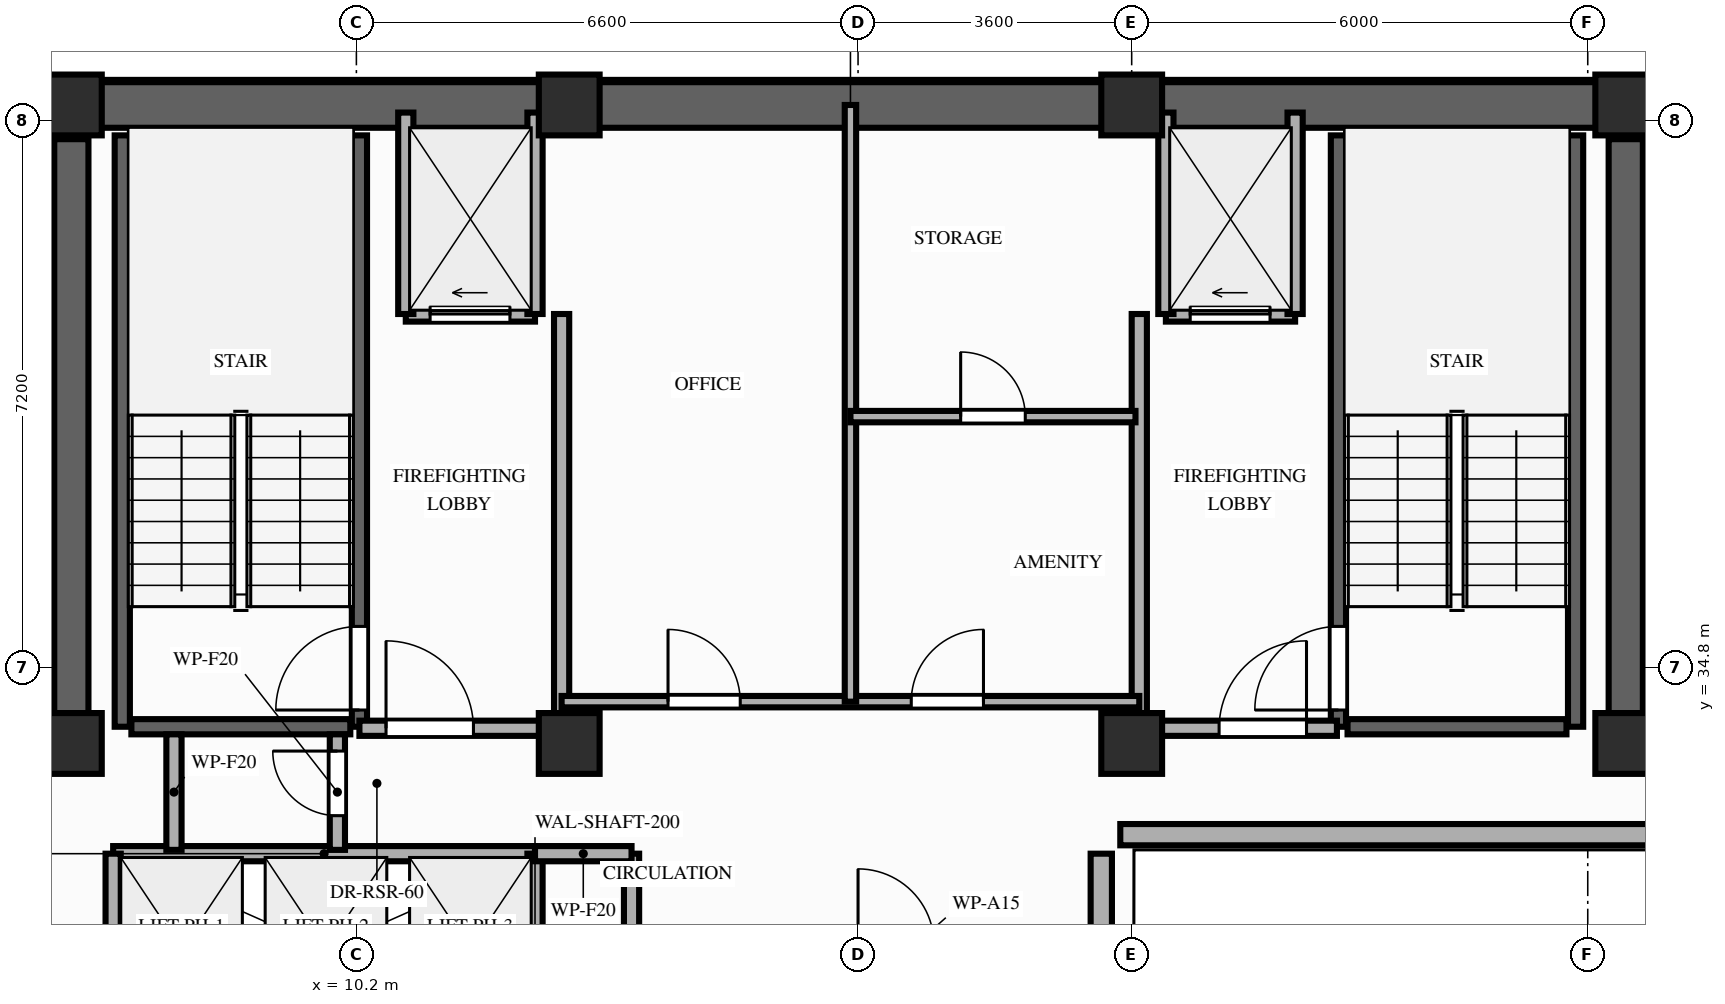
"""IFC4 building model, lengths in metres.
Left out: names, types, materials, properties, quantities, classifications, styles, units other than length and angle.
Written with IfcOpenShell. Run it as: python <this file> out.ifc"""

import sys

from ifc_helpers import new_model, si_unit, direction, frame, frame_2d, origin, origin_2d, place, context, subcontext, project, spatial, rectangle, extrude, element, fill, save


model = new_model("IFC4")
c1 = context("Model", 3, precision=1e-05, world=origin(), true_north=direction((0.0, 1.0)))
c2 = subcontext(c1, "Body", "Model", "MODEL_VIEW")
j1 = project(units=[si_unit("LENGTHUNIT", "METRE"), si_unit("PLANEANGLEUNIT", "RADIAN")], contexts=[c1])
p1 = place(None, origin())
s1 = spatial("IfcSite", under=j1, at=p1, CompositionType="ELEMENT")
p2 = place(p1, origin())
s2 = spatial("IfcBuilding", under=s1, at=p2, CompositionType="ELEMENT")
p3 = place(p2, frame((0.0, 0.0, 208.0)))
s3 = spatial("IfcBuildingStorey", under=s2, at=p3, CompositionType="ELEMENT", Elevation=208.0)
for number, where, z_axis, x_axis in (
    (1, (6.45, 33.8, 0.0), (0.0, 0.0, 1.0), (1.0, 0.0, 0.0)),
    (2, (13.0, 33.8, 0.0), (0.0, 0.0, 1.0), (1.0, 0.0, 0.0)),
    (3, (20.4, 33.8, 0.0), (0.0, 0.0, 1.0), (1.0, 0.0, 0.0)),
    (4, (26.9, 33.8, 0.0), (0.0, 0.0, 1.0), (1.0, 0.0, 0.0)),
    (5, (6.45, 42.2, 0.0), (0.0, 0.0, 1.0), (1.0, 0.0, 0.0)),
    (6, (13.0, 42.2, 0.0), (0.0, 0.0, 1.0), (1.0, 0.0, 0.0)),
    (7, (20.4, 42.2, 0.0), (0.0, 0.0, 1.0), (1.0, 0.0, 0.0)),
    (8, (26.9, 42.2, 0.0), (0.0, 0.0, 1.0), (1.0, 0.0, 0.0)),
):
    element("IfcColumn", number, at=place(p3, frame(where, z_axis=z_axis, x_axis=x_axis)), inside=s3, PredefinedType="COLUMN", context=c2, shape_type="SweptSolid", body=[
        extrude(rectangle(XDim=0.8, YDim=0.8, at=origin_2d()), origin(), (0.0, 0.0, 1.0), 3.2),
    ])
p4 = place(p3, frame((20.0, 8.8, 0.0), z_axis=(0.0, 0.0, 1.0), x_axis=(0.0, 1.0, 0.0)))
e9 = element("IfcWall", 9, at=p4, inside=s3, PredefinedType="STANDARD", context=c2, shape_type="SweptSolid", body=[
    extrude(rectangle(XDim=23.55, YDim=0.28, at=frame_2d((11.775, 0.0))), origin(), (0.0, 0.0, 1.0), 2.51),
])
p5 = place(p4, frame((5.12, 0.0, 0.85)))
e10 = element("IfcOpeningElement", 10, at=p5, cuts=e9, PredefinedType="OPENING", context=c2, shape_type="SweptSolid", body=[
    extrude(rectangle(XDim=2.1, YDim=1.41, at=frame_2d((1.05, 0.705))), frame((0.0, 0.15, 0.0), z_axis=(0.0, -1.0, 0.0), x_axis=(1.0, 0.0, 0.0)), (0.0, 0.0, 1.0), 0.3),
])
p6 = place(p3, frame((20.25, 32.6, 0.0), z_axis=(0.0, 0.0, 1.0), x_axis=(1.0, 0.0, 0.0)))
e11 = element("IfcWall", 11, at=p6, inside=s3, PredefinedType="STANDARD", context=c2, shape_type="SweptSolid", body=[
    extrude(rectangle(XDim=7.35, YDim=0.28, at=frame_2d((3.675, 0.0))), origin(), (0.0, 0.0, 1.0), 2.51),
])
p7 = place(p3, frame((6.45, 42.2, 0.0), z_axis=(0.0, 0.0, 1.0), x_axis=(1.0, 0.0, 0.0)))
e12 = element("IfcWall", 12, at=p7, inside=s3, PredefinedType="SHEAR", context=c2, shape_type="SweptSolid", body=[
    extrude(rectangle(XDim=20.45, YDim=0.6, at=frame_2d((10.225, 0.0))), origin(), (0.0, 0.0, 1.0), 3.02),
])
for number, where, z_axis, x_axis in (
    (13, (6.45, 33.8, 0.0), (0.0, 0.0, 1.0), (0.0, 1.0, 0.0)),
    (14, (26.9, 33.8, 0.0), (0.0, 0.0, 1.0), (0.0, 1.0, 0.0)),
):
    element("IfcWall", number, at=place(p3, frame(where, z_axis=z_axis, x_axis=x_axis)), inside=s3, PredefinedType="SHEAR", context=c2, shape_type="SweptSolid", body=[
        extrude(rectangle(XDim=7.95, YDim=0.45, at=frame_2d((3.975, 0.0))), origin(), (0.0, 0.0, 1.0), 3.02),
    ])
p8 = place(p3, frame((7.12, 34.02, 0.0), z_axis=(0.0, 0.0, 1.0), x_axis=(0.0, 1.0, 0.0)))
e15 = element("IfcWall", 15, at=p8, inside=s3, PredefinedType="SHEAR", context=c2, shape_type="SweptSolid", body=[
    extrude(rectangle(XDim=7.78, YDim=0.2, at=frame_2d((3.89, 0.0))), origin(), (0.0, 0.0, 1.0), 3.02),
])
p9 = place(p3, frame((10.24, 34.02, 0.0), z_axis=(0.0, 0.0, 1.0), x_axis=(0.0, 1.0, 0.0)))
e16 = element("IfcWall", 16, at=p9, inside=s3, PredefinedType="SHEAR", context=c2, shape_type="SweptSolid", body=[
    extrude(rectangle(XDim=7.78, YDim=0.2, at=frame_2d((3.89, 0.0))), origin(), (0.0, 0.0, 1.0), 3.02),
])
p10 = place(p9, frame((0.22, 0.0, 0.0)))
e17 = element("IfcOpeningElement", 17, at=p10, cuts=e16, PredefinedType="OPENING", context=c2, shape_type="SweptSolid", body=[
    extrude(rectangle(XDim=1.1, YDim=2.15, at=frame_2d((0.55, 1.075))), frame((0.0, 0.11, 0.0), z_axis=(0.0, -1.0, 0.0), x_axis=(1.0, 0.0, 0.0)), (0.0, 0.0, 1.0), 0.22),
])
p11 = place(p3, frame((7.24, 34.02, 0.0), z_axis=(0.0, 0.0, 1.0), x_axis=(1.0, 0.0, 0.0)))
e18 = element("IfcWall", 18, at=p11, inside=s3, PredefinedType="SHEAR", context=c2, shape_type="SweptSolid", body=[
    extrude(rectangle(XDim=2.88, YDim=0.2, at=frame_2d((1.44, 0.0))), origin(), (0.0, 0.0, 1.0), 3.02),
])
p12 = place(p3, frame((23.12, 34.02, 0.0), z_axis=(0.0, 0.0, 1.0), x_axis=(0.0, 1.0, 0.0)))
e19 = element("IfcWall", 19, at=p12, inside=s3, PredefinedType="SHEAR", context=c2, shape_type="SweptSolid", body=[
    extrude(rectangle(XDim=7.78, YDim=0.2, at=frame_2d((3.89, 0.0))), origin(), (0.0, 0.0, 1.0), 3.02),
])
p13 = place(p12, frame((0.22, 0.0, 0.0)))
e20 = element("IfcOpeningElement", 20, at=p13, cuts=e19, PredefinedType="OPENING", context=c2, shape_type="SweptSolid", body=[
    extrude(rectangle(XDim=1.1, YDim=2.15, at=frame_2d((0.55, 1.075))), frame((0.0, 0.11, 0.0), z_axis=(0.0, -1.0, 0.0), x_axis=(1.0, 0.0, 0.0)), (0.0, 0.0, 1.0), 0.22),
])
p14 = place(p3, frame((26.24, 34.02, 0.0), z_axis=(0.0, 0.0, 1.0), x_axis=(0.0, 1.0, 0.0)))
e21 = element("IfcWall", 21, at=p14, inside=s3, PredefinedType="SHEAR", context=c2, shape_type="SweptSolid", body=[
    extrude(rectangle(XDim=7.78, YDim=0.2, at=frame_2d((3.89, 0.0))), origin(), (0.0, 0.0, 1.0), 3.02),
])
p15 = place(p3, frame((23.24, 34.02, 0.0), z_axis=(0.0, 0.0, 1.0), x_axis=(1.0, 0.0, 0.0)))
e22 = element("IfcWall", 22, at=p15, inside=s3, PredefinedType="SHEAR", context=c2, shape_type="SweptSolid", body=[
    extrude(rectangle(XDim=2.88, YDim=0.2, at=frame_2d((1.44, 0.0))), origin(), (0.0, 0.0, 1.0), 3.02),
])
p16 = place(p3, frame((7.0, 32.35, 0.0), z_axis=(0.0, 0.0, 1.0), x_axis=(1.0, 0.0, 0.0)))
e23 = element("IfcWall", 23, at=p16, inside=s3, PredefinedType="MOVABLE", context=c2, shape_type="SweptSolid", body=[
    extrude(rectangle(XDim=5.55, YDim=0.2, at=frame_2d((2.775, 0.0))), origin(), (0.0, 0.0, 1.0), 3.02),
])
for number, where, z_axis, x_axis in (
    (24, (7.0, 29.85, 0.0), (0.0, 0.0, 1.0), (0.0, 1.0, 0.0)),
    (25, (12.55, 29.85, 0.0), (0.0, 0.0, 1.0), (0.0, 1.0, 0.0)),
):
    element("IfcWall", number, at=place(p3, frame(where, z_axis=z_axis, x_axis=x_axis)), inside=s3, PredefinedType="MOVABLE", context=c2, shape_type="SweptSolid", body=[
        extrude(rectangle(XDim=2.5, YDim=0.2, at=frame_2d((1.25, 0.0))), origin(), (0.0, 0.0, 1.0), 3.02),
    ])
p17 = place(p3, frame((10.85, 39.45, 0.0), z_axis=(0.0, 0.0, 1.0), x_axis=(1.0, 0.0, 0.0)))
e26 = element("IfcWall", 26, at=p17, inside=s3, PredefinedType="MOVABLE", context=c2, shape_type="SweptSolid", body=[
    extrude(rectangle(XDim=1.7, YDim=0.2, at=frame_2d((0.85, 0.0))), origin(), (0.0, 0.0, 1.0), 3.02),
])
p18 = place(p17, frame((0.32, 0.0, 0.0)))
e27 = element("IfcOpeningElement", 27, at=p18, cuts=e26, PredefinedType="OPENING", context=c2, shape_type="SweptSolid", body=[
    extrude(rectangle(XDim=1.05, YDim=2.15, at=frame_2d((0.525, 1.075))), frame((0.0, 0.11, 0.0), z_axis=(0.0, -1.0, 0.0), x_axis=(1.0, 0.0, 0.0)), (0.0, 0.0, 1.0), 0.22),
])
p19 = place(p3, frame((20.85, 39.45, 0.0), z_axis=(0.0, 0.0, 1.0), x_axis=(1.0, 0.0, 0.0)))
e28 = element("IfcWall", 28, at=p19, inside=s3, PredefinedType="MOVABLE", context=c2, shape_type="SweptSolid", body=[
    extrude(rectangle(XDim=1.7, YDim=0.2, at=frame_2d((0.85, 0.0))), origin(), (0.0, 0.0, 1.0), 3.02),
])
p20 = place(p19, frame((0.32, 0.0, 0.0)))
e29 = element("IfcOpeningElement", 29, at=p20, cuts=e28, PredefinedType="OPENING", context=c2, shape_type="SweptSolid", body=[
    extrude(rectangle(XDim=1.05, YDim=2.15, at=frame_2d((0.525, 1.075))), frame((0.0, 0.11, 0.0), z_axis=(0.0, -1.0, 0.0), x_axis=(1.0, 0.0, 0.0)), (0.0, 0.0, 1.0), 0.22),
])
for number, where, z_axis, x_axis in (
    (30, (10.85, 39.45, 0.0), (0.0, 0.0, 1.0), (0.0, 1.0, 0.0)),
    (31, (12.55, 39.45, 0.0), (0.0, 0.0, 1.0), (0.0, 1.0, 0.0)),
):
    element("IfcWall", number, at=place(p3, frame(where, z_axis=z_axis, x_axis=x_axis)), inside=s3, PredefinedType="MOVABLE", context=c2, shape_type="SweptSolid", body=[
        extrude(rectangle(XDim=2.65, YDim=0.2, at=frame_2d((1.325, 0.0))), origin(), (0.0, 0.0, 1.0), 2.51),
    ])
p21 = place(p3, frame((12.9, 34.0, 0.0), z_axis=(0.0, 0.0, 1.0), x_axis=(0.0, 1.0, 0.0)))
e32 = element("IfcWall", 32, at=p21, inside=s3, PredefinedType="PARTITIONING", context=c2, shape_type="SweptSolid", body=[
    extrude(rectangle(XDim=5.45, YDim=0.2, at=frame_2d((2.725, 0.0))), origin(), (0.0, 0.0, 1.0), 2.51),
])
p22 = place(p3, frame((10.24, 34.0, 0.0), z_axis=(0.0, 0.0, 1.0), x_axis=(1.0, 0.0, 0.0)))
e33 = element("IfcWall", 33, at=p22, inside=s3, PredefinedType="PARTITIONING", context=c2, shape_type="SweptSolid", body=[
    extrude(rectangle(XDim=2.66, YDim=0.2, at=frame_2d((1.33, 0.0))), origin(), (0.0, 0.0, 1.0), 2.51),
])
p23 = place(p22, frame((0.35, 0.0, 0.0)))
e34 = element("IfcOpeningElement", 34, at=p23, cuts=e33, PredefinedType="OPENING", context=c2, shape_type="SweptSolid", body=[
    extrude(rectangle(XDim=1.15, YDim=2.15, at=frame_2d((0.575, 1.075))), frame((0.0, 0.11, 0.0), z_axis=(0.0, -1.0, 0.0), x_axis=(1.0, 0.0, 0.0)), (0.0, 0.0, 1.0), 0.22),
])
for number, where, z_axis, x_axis in (
    (35, (20.85, 39.45, 0.0), (0.0, 0.0, 1.0), (0.0, 1.0, 0.0)),
    (36, (22.55, 39.45, 0.0), (0.0, 0.0, 1.0), (0.0, 1.0, 0.0)),
):
    element("IfcWall", number, at=place(p3, frame(where, z_axis=z_axis, x_axis=x_axis)), inside=s3, PredefinedType="MOVABLE", context=c2, shape_type="SweptSolid", body=[
        extrude(rectangle(XDim=2.65, YDim=0.2, at=frame_2d((1.325, 0.0))), origin(), (0.0, 0.0, 1.0), 2.51),
    ])
p24 = place(p3, frame((20.5, 34.0, 0.0), z_axis=(0.0, 0.0, 1.0), x_axis=(0.0, 1.0, 0.0)))
e37 = element("IfcWall", 37, at=p24, inside=s3, PredefinedType="PARTITIONING", context=c2, shape_type="SweptSolid", body=[
    extrude(rectangle(XDim=5.45, YDim=0.2, at=frame_2d((2.725, 0.0))), origin(), (0.0, 0.0, 1.0), 2.51),
])
p25 = place(p3, frame((20.5, 34.0, 0.0), z_axis=(0.0, 0.0, 1.0), x_axis=(1.0, 0.0, 0.0)))
e38 = element("IfcWall", 38, at=p25, inside=s3, PredefinedType="PARTITIONING", context=c2, shape_type="SweptSolid", body=[
    extrude(rectangle(XDim=2.6, YDim=0.2, at=frame_2d((1.3, 0.0))), origin(), (0.0, 0.0, 1.0), 2.51),
])
p26 = place(p25, frame((1.05, 0.0, 0.0)))
e39 = element("IfcOpeningElement", 39, at=p26, cuts=e38, PredefinedType="OPENING", context=c2, shape_type="SweptSolid", body=[
    extrude(rectangle(XDim=1.15, YDim=2.15, at=frame_2d((0.575, 1.075))), frame((0.0, 0.11, 0.0), z_axis=(0.0, -1.0, 0.0), x_axis=(1.0, 0.0, 0.0)), (0.0, 0.0, 1.0), 0.22),
])
p27 = place(p3, frame((13.82, 29.85, 0.0), z_axis=(0.0, 0.0, 1.0), x_axis=(0.0, 1.0, 0.0)))
e40 = element("IfcWall", 40, at=p27, inside=s3, PredefinedType="PARTITIONING", context=c2, shape_type="SweptSolid", body=[
    extrude(rectangle(XDim=2.5, YDim=0.2, at=frame_2d((1.25, 0.0))), origin(), (0.0, 0.0, 1.0), 3.02),
])
p28 = place(p3, frame((12.55, 32.35, 0.0), z_axis=(0.0, 0.0, 1.0), x_axis=(1.0, 0.0, 0.0)))
e41 = element("IfcWall", 41, at=p28, inside=s3, PredefinedType="PARTITIONING", context=c2, shape_type="SweptSolid", body=[
    extrude(rectangle(XDim=1.27, YDim=0.2, at=frame_2d((0.635, 0.0))), origin(), (0.0, 0.0, 1.0), 3.02),
])
p29 = place(p3, frame((7.8, 32.4, 0.0), z_axis=(0.0, 0.0, 1.0), x_axis=(0.0, 1.0, 0.0)))
e42 = element("IfcWall", 42, at=p29, inside=s3, PredefinedType="PARTITIONING", context=c2, shape_type="SweptSolid", body=[
    extrude(rectangle(XDim=1.52, YDim=0.2, at=frame_2d((0.76, 0.0))), origin(), (0.0, 0.0, 1.0), 2.51),
])
p30 = place(p3, frame((9.95, 32.4, 0.0), z_axis=(0.0, 0.0, 1.0), x_axis=(0.0, 1.0, 0.0)))
e43 = element("IfcWall", 43, at=p30, inside=s3, PredefinedType="PARTITIONING", context=c2, shape_type="SweptSolid", body=[
    extrude(rectangle(XDim=1.52, YDim=0.2, at=frame_2d((0.76, 0.0))), origin(), (0.0, 0.0, 1.0), 2.51),
])
p31 = place(p30, frame((0.45, 0.0, 0.0)))
e44 = element("IfcOpeningElement", 44, at=p31, cuts=e43, PredefinedType="OPENING", context=c2, shape_type="SweptSolid", body=[
    extrude(rectangle(XDim=0.85, YDim=2.05, at=frame_2d((0.425, 1.025))), frame((0.0, 0.11, 0.0), z_axis=(0.0, -1.0, 0.0), x_axis=(1.0, 0.0, 0.0)), (0.0, 0.0, 1.0), 0.22),
])
p32 = place(p3, frame((12.9, 34.35, 0.0), z_axis=(0.0, 0.0, 1.0), x_axis=(1.0, 0.0, 0.0)))
e45 = element("IfcWall", 45, at=p32, inside=s3, PredefinedType="PARTITIONING", context=c2, shape_type="SweptSolid", body=[
    extrude(rectangle(XDim=7.6, YDim=0.15, at=frame_2d((3.8, 0.0))), origin(), (0.0, 0.0, 1.0), 3.02),
])
p33 = place(p32, frame((1.4, 0.0, 0.0)))
e46 = element("IfcOpeningElement", 46, at=p33, cuts=e45, PredefinedType="OPENING", context=c2, shape_type="SweptSolid", body=[
    extrude(rectangle(XDim=0.95, YDim=2.15, at=frame_2d((0.475, 1.075))), frame((0.0, 0.085, 0.0), z_axis=(0.0, -1.0, 0.0), x_axis=(1.0, 0.0, 0.0)), (0.0, 0.0, 1.0), 0.17),
])
p34 = place(p32, frame((4.6, 0.0, 0.0)))
e47 = element("IfcOpeningElement", 47, at=p34, cuts=e45, PredefinedType="OPENING", context=c2, shape_type="SweptSolid", body=[
    extrude(rectangle(XDim=0.95, YDim=2.15, at=frame_2d((0.475, 1.075))), frame((0.0, 0.085, 0.0), z_axis=(0.0, -1.0, 0.0), x_axis=(1.0, 0.0, 0.0)), (0.0, 0.0, 1.0), 0.17),
])
p35 = place(p3, frame((16.7, 34.35, 0.0), z_axis=(0.0, 0.0, 1.0), x_axis=(0.0, 1.0, 0.0)))
e48 = element("IfcWall", 48, at=p35, inside=s3, PredefinedType="PARTITIONING", context=c2, shape_type="SweptSolid", body=[
    extrude(rectangle(XDim=7.85, YDim=0.15, at=frame_2d((3.925, 0.0))), origin(), (0.0, 0.0, 1.0), 2.51),
])
p36 = place(p3, frame((16.7, 38.1, 0.0), z_axis=(0.0, 0.0, 1.0), x_axis=(1.0, 0.0, 0.0)))
e49 = element("IfcWall", 49, at=p36, inside=s3, PredefinedType="PARTITIONING", context=c2, shape_type="SweptSolid", body=[
    extrude(rectangle(XDim=3.75, YDim=0.15, at=frame_2d((1.875, 0.0))), origin(), (0.0, 0.0, 1.0), 3.02),
])
p37 = place(p36, frame((1.45, 0.0, 0.0)))
e50 = element("IfcOpeningElement", 50, at=p37, cuts=e49, PredefinedType="OPENING", context=c2, shape_type="SweptSolid", body=[
    extrude(rectangle(XDim=0.85, YDim=2.05, at=frame_2d((0.425, 1.025))), frame((0.0, 0.085, 0.0), z_axis=(0.0, -1.0, 0.0), x_axis=(1.0, 0.0, 0.0)), (0.0, 0.0, 1.0), 0.17),
])
p38 = place(p10, origin())
e51 = element("IfcDoor", 51, at=p38, inside=s3, OperationType="SINGLE_SWING_LEFT", PredefinedType="DOOR", context=c2, shape_type="SweptSolid", body=[
    extrude(rectangle(XDim=1.1, YDim=2.15, at=frame_2d((0.55, 1.075))), frame((0.0, 0.025, 0.0), z_axis=(0.0, -1.0, 0.0), x_axis=(1.0, 0.0, 0.0)), (0.0, 0.0, 1.0), 0.05),
])
fill(e17, e51)
p39 = place(p13, origin())
e52 = element("IfcDoor", 52, at=p39, inside=s3, OperationType="SINGLE_SWING_LEFT", PredefinedType="DOOR", context=c2, shape_type="SweptSolid", body=[
    extrude(rectangle(XDim=1.1, YDim=2.15, at=frame_2d((0.55, 1.075))), frame((0.0, 0.025, 0.0), z_axis=(0.0, -1.0, 0.0), x_axis=(1.0, 0.0, 0.0)), (0.0, 0.0, 1.0), 0.05),
])
fill(e20, e52)
p40 = place(p18, origin())
e53 = element("IfcDoor", 53, at=p40, inside=s3, OperationType="SLIDING_TO_LEFT", PredefinedType="DOOR", context=c2, shape_type="SweptSolid", body=[
    extrude(rectangle(XDim=1.05, YDim=2.15, at=frame_2d((0.525, 1.075))), frame((0.0, 0.025, 0.0), z_axis=(0.0, -1.0, 0.0), x_axis=(1.0, 0.0, 0.0)), (0.0, 0.0, 1.0), 0.05),
])
fill(e27, e53)
p41 = place(p20, origin())
e54 = element("IfcDoor", 54, at=p41, inside=s3, OperationType="SLIDING_TO_LEFT", PredefinedType="DOOR", context=c2, shape_type="SweptSolid", body=[
    extrude(rectangle(XDim=1.05, YDim=2.15, at=frame_2d((0.525, 1.075))), frame((0.0, 0.025, 0.0), z_axis=(0.0, -1.0, 0.0), x_axis=(1.0, 0.0, 0.0)), (0.0, 0.0, 1.0), 0.05),
])
fill(e29, e54)
p42 = place(p23, origin())
e55 = element("IfcDoor", 55, at=p42, inside=s3, OperationType="SINGLE_SWING_LEFT", PredefinedType="DOOR", context=c2, shape_type="SweptSolid", body=[
    extrude(rectangle(XDim=1.15, YDim=2.15, at=frame_2d((0.575, 1.075))), frame((0.0, 0.025, 0.0), z_axis=(0.0, -1.0, 0.0), x_axis=(1.0, 0.0, 0.0)), (0.0, 0.0, 1.0), 0.05),
])
fill(e34, e55)
p43 = place(p26, origin())
e56 = element("IfcDoor", 56, at=p43, inside=s3, OperationType="SINGLE_SWING_RIGHT", PredefinedType="DOOR", context=c2, shape_type="SweptSolid", body=[
    extrude(rectangle(XDim=1.15, YDim=2.15, at=frame_2d((0.575, 1.075))), frame((0.0, 0.025, 0.0), z_axis=(0.0, -1.0, 0.0), x_axis=(1.0, 0.0, 0.0)), (0.0, 0.0, 1.0), 0.05),
])
fill(e39, e56)
p44 = place(p31, origin())
e57 = element("IfcDoor", 57, at=p44, inside=s3, OperationType="SINGLE_SWING_RIGHT", PredefinedType="DOOR", context=c2, shape_type="SweptSolid", body=[
    extrude(rectangle(XDim=0.85, YDim=2.05, at=frame_2d((0.425, 1.025))), frame((0.0, 0.025, 0.0), z_axis=(0.0, -1.0, 0.0), x_axis=(1.0, 0.0, 0.0)), (0.0, 0.0, 1.0), 0.05),
])
fill(e44, e57)
p45 = place(p33, origin())
e58 = element("IfcDoor", 58, at=p45, inside=s3, OperationType="SINGLE_SWING_LEFT", PredefinedType="DOOR", context=c2, shape_type="SweptSolid", body=[
    extrude(rectangle(XDim=0.95, YDim=2.15, at=frame_2d((0.475, 1.075))), frame((0.0, 0.025, 0.0), z_axis=(0.0, -1.0, 0.0), x_axis=(1.0, 0.0, 0.0)), (0.0, 0.0, 1.0), 0.05),
])
fill(e46, e58)
p46 = place(p34, origin())
e59 = element("IfcDoor", 59, at=p46, inside=s3, OperationType="SINGLE_SWING_RIGHT", PredefinedType="DOOR", context=c2, shape_type="SweptSolid", body=[
    extrude(rectangle(XDim=0.95, YDim=2.15, at=frame_2d((0.475, 1.075))), frame((0.0, 0.025, 0.0), z_axis=(0.0, -1.0, 0.0), x_axis=(1.0, 0.0, 0.0)), (0.0, 0.0, 1.0), 0.05),
])
fill(e47, e59)
p47 = place(p37, origin())
e60 = element("IfcDoor", 60, at=p47, inside=s3, OperationType="SINGLE_SWING_LEFT", PredefinedType="DOOR", context=c2, shape_type="SweptSolid", body=[
    extrude(rectangle(XDim=0.85, YDim=2.05, at=frame_2d((0.425, 1.025))), frame((0.0, 0.025, 0.0), z_axis=(0.0, -1.0, 0.0), x_axis=(1.0, 0.0, 0.0)), (0.0, 0.0, 1.0), 0.05),
])
fill(e50, e60)
save(model, sys.argv[1])
